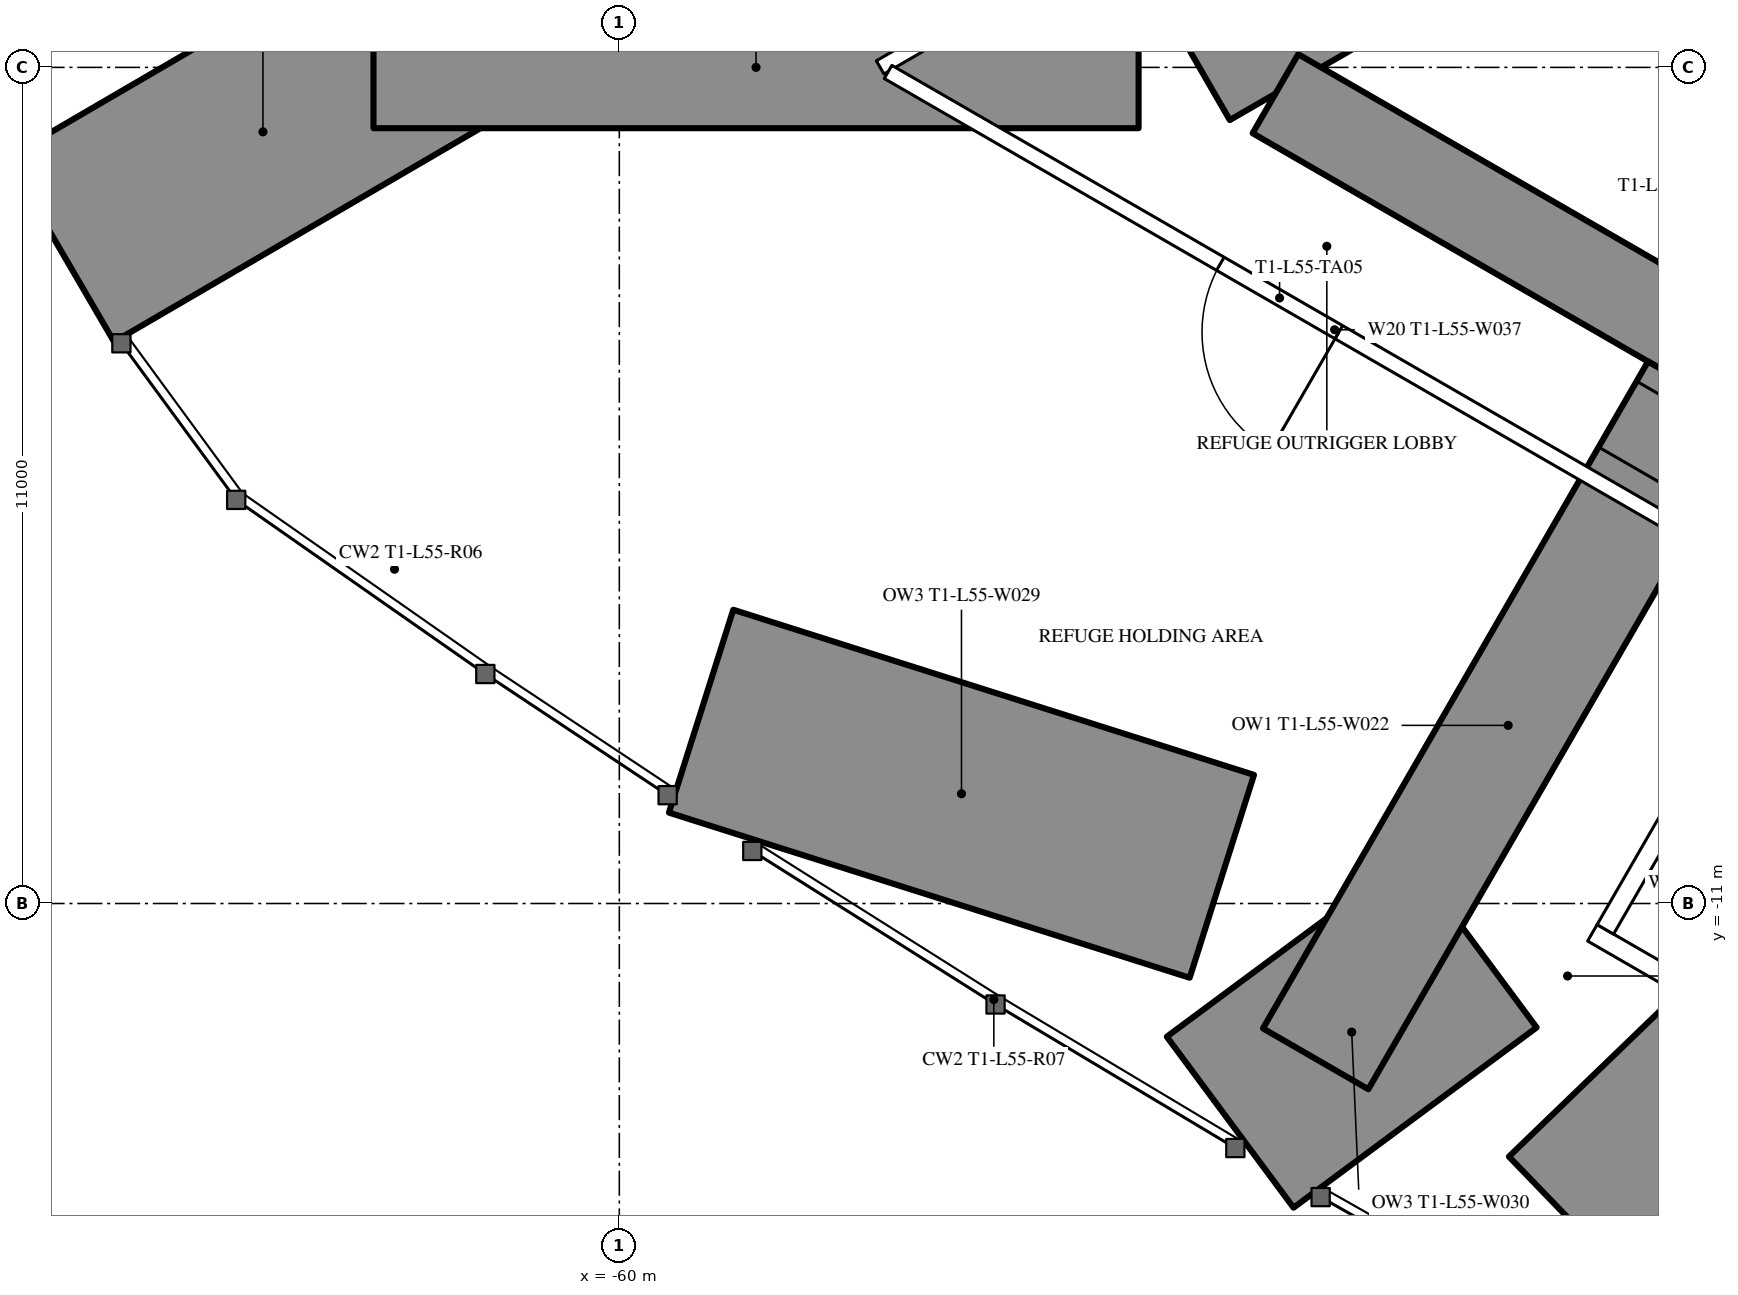
"""IFC4 building model, lengths in metres.
Left out: names, types, materials, properties, quantities, classifications, styles, units other than length and angle.
Written with IfcOpenShell. Run it as: python <this file> out.ifc"""

import sys

from ifc_helpers import new_model, si_unit, direction, frame, frame_2d, origin, place, context, subcontext, project, spatial, rectangle, extrude, element, fill, save


model = new_model("IFC4")
c1 = context("Model", 3, precision=1e-05, world=origin(), true_north=direction((0.0, 1.0)))
c2 = subcontext(c1, "Body", "Model", "MODEL_VIEW")
j1 = project(units=[si_unit("LENGTHUNIT", "METRE"), si_unit("PLANEANGLEUNIT", "RADIAN")], contexts=[c1])
p1 = place(None, origin())
s1 = spatial("IfcSite", under=j1, at=p1, CompositionType="ELEMENT")
p2 = place(p1, origin())
s2 = spatial("IfcBuilding", under=s1, at=p2, CompositionType="ELEMENT")
p3 = place(p2, frame((0.0, 0.0, 205.3)))
s3 = spatial("IfcBuildingStorey", under=s2, at=p3, CompositionType="ELEMENT", Elevation=205.3)
p4 = place(p3, frame((-67.352, -2.4, 0.0), z_axis=(0.0, 0.0, 1.0), x_axis=(0.863922467906, 0.503624830054, 0.0)))
e1 = element("IfcWall", 1, at=p4, inside=s3, PredefinedType="SHEAR", context=c2, shape_type="SweptSolid", body=[
    extrude(rectangle(XDim=6.166, YDim=2.8, at=frame_2d((3.083, 0.0))), origin(), (0.0, 0.0, 1.0), 5.0),
])
p5 = place(p3, frame((-58.924, -8.47, 0.0), z_axis=(0.0, 0.0, 1.0), x_axis=(0.953237559777, -0.302222028698, 0.0)))
e2 = element("IfcWall", 2, at=p5, inside=s3, PredefinedType="SHEAR", context=c2, shape_type="SweptSolid", body=[
    extrude(rectangle(XDim=7.187, YDim=2.8, at=frame_2d((3.594, 0.0))), origin(), (0.0, 0.0, 1.0), 5.0),
])
p6 = place(p3, frame((-51.964, -13.877, 0.0), z_axis=(0.0, 0.0, 1.0), x_axis=(0.80337247009, 0.595476846151, 0.0)))
e3 = element("IfcWall", 3, at=p6, inside=s3, PredefinedType="SHEAR", context=c2, shape_type="SweptSolid", body=[
    extrude(rectangle(XDim=3.981, YDim=2.8, at=frame_2d((1.99, 0.0))), origin(), (0.0, 0.0, 1.0), 5.0),
])
p7 = place(p3, frame((-42.929, -17.879, 0.0), z_axis=(0.0, 0.0, 1.0), x_axis=(-0.694103918888, 0.719874815356, 0.0)))
e4 = element("IfcWall", 4, at=p7, inside=s3, PredefinedType="SHEAR", context=c2, shape_type="SweptSolid", body=[
    extrude(rectangle(XDim=6.281, YDim=2.8, at=frame_2d((3.141, 0.0))), origin(), (0.0, 0.0, 1.0), 5.0),
])
p8 = place(p3, frame((-27.2, 14.3, 0.0), z_axis=(0.0, 0.0, 1.0), x_axis=(-0.866026593062, -0.499997940104, 0.0)))
e5 = element("IfcWall", 5, at=p8, inside=s3, PredefinedType="SHEAR", context=c2, shape_type="SweptSolid", body=[
    extrude(rectangle(XDim=28.946, YDim=1.2, at=frame_2d((14.473, 0.0))), origin(), (0.0, 0.0, 1.0), 5.0),
])
p9 = place(p8, frame((6.5, 0.0, 0.0)))
e6 = element("IfcOpeningElement", 6, at=p9, cuts=e5, PredefinedType="OPENING", context=c2, shape_type="SweptSolid", body=[
    extrude(rectangle(XDim=1.0, YDim=2.2, at=frame_2d((0.5, 1.1))), frame((0.0, 0.61, 0.0), z_axis=(0.0, -1.0, 0.0), x_axis=(1.0, 0.0, 0.0)), (0.0, 0.0, 1.0), 1.22),
])
p10 = place(p8, frame((13.568, 0.0, 0.0)))
e7 = element("IfcOpeningElement", 7, at=p10, cuts=e5, PredefinedType="OPENING", context=c2, shape_type="SweptSolid", body=[
    extrude(rectangle(XDim=1.8, YDim=2.2, at=frame_2d((0.9, 1.1))), frame((0.0, 0.61, 0.0), z_axis=(0.0, -1.0, 0.0), x_axis=(1.0, 0.0, 0.0)), (0.0, 0.0, 1.0), 1.22),
])
p11 = place(p3, frame((-27.2, -14.3, 0.0), z_axis=(0.0, 0.0, 1.0), x_axis=(-0.866024021859, 0.500002393557, 0.0)))
e8 = element("IfcWall", 8, at=p11, inside=s3, PredefinedType="SHEAR", context=c2, shape_type="SweptSolid", body=[
    extrude(rectangle(XDim=27.907, YDim=1.2, at=frame_2d((13.954, 0.0))), origin(), (0.0, 0.0, 1.0), 5.0),
])
p12 = place(p11, frame((6.5, 0.0, 0.0)))
e9 = element("IfcOpeningElement", 9, at=p12, cuts=e8, PredefinedType="OPENING", context=c2, shape_type="SweptSolid", body=[
    extrude(rectangle(XDim=1.0, YDim=2.2, at=frame_2d((0.5, 1.1))), frame((0.0, 0.61, 0.0), z_axis=(0.0, -1.0, 0.0), x_axis=(1.0, 0.0, 0.0)), (0.0, 0.0, 1.0), 1.22),
])
p13 = place(p11, frame((13.568, 0.0, 0.0)))
e10 = element("IfcOpeningElement", 10, at=p13, cuts=e8, PredefinedType="OPENING", context=c2, shape_type="SweptSolid", body=[
    extrude(rectangle(XDim=1.8, YDim=2.2, at=frame_2d((0.9, 1.1))), frame((0.0, 0.61, 0.0), z_axis=(0.0, -1.0, 0.0), x_axis=(1.0, 0.0, 0.0)), (0.0, 0.0, 1.0), 1.22),
])
p14 = place(p3, frame((-53.168, 0.0, 0.0), z_axis=(0.0, 0.0, 1.0), x_axis=(-1.0, 0.0, 0.0)))
e11 = element("IfcWall", 11, at=p14, inside=s3, PredefinedType="SHEAR", context=c2, shape_type="SweptSolid", body=[
    extrude(rectangle(XDim=10.066, YDim=1.6, at=frame_2d((5.033, 0.0))), origin(), (0.0, 0.0, 1.0), 5.0),
])
p15 = place(p3, frame((-45.773, -4.27, 0.0), z_axis=(0.0, 0.0, 1.0), x_axis=(-0.499995723283, -0.866027872934, 0.0)))
e12 = element("IfcWall", 12, at=p15, inside=s3, PredefinedType="SHEAR", context=c2, shape_type="SweptSolid", body=[
    extrude(rectangle(XDim=10.131, YDim=1.6, at=frame_2d((5.065, 0.0))), origin(), (0.0, 0.0, 1.0), 5.0),
])
p16 = place(p15, frame((0.3, 0.0, 0.0)))
e13 = element("IfcOpeningElement", 13, at=p16, cuts=e12, PredefinedType="OPENING", context=c2, shape_type="SweptSolid", body=[
    extrude(rectangle(XDim=1.0, YDim=2.2, at=frame_2d((0.5, 1.1))), frame((0.0, 0.81, 0.0), z_axis=(0.0, -1.0, 0.0), x_axis=(1.0, 0.0, 0.0)), (0.0, 0.0, 1.0), 1.62),
])
p17 = place(p3, frame((-27.86, 16.575, 0.0), z_axis=(0.0, 0.0, 1.0), x_axis=(-0.866025533911, -0.499999774615, 0.0)))
e14 = element("IfcWall", 14, at=p17, inside=s3, PredefinedType="PARTITIONING", context=c2, shape_type="SweptSolid", body=[
    extrude(rectangle(XDim=33.149, YDim=0.2, at=frame_2d((16.575, 0.0))), origin(), (0.0, 0.0, 1.0), 4.75),
])
p18 = place(p17, frame((6.051, 0.0, 0.0)))
e15 = element("IfcOpeningElement", 15, at=p18, cuts=e14, PredefinedType="OPENING", context=c2, shape_type="SweptSolid", body=[
    extrude(rectangle(XDim=1.8, YDim=2.2, at=frame_2d((0.9, 1.1))), frame((0.0, 0.11, 0.0), z_axis=(0.0, -1.0, 0.0), x_axis=(1.0, 0.0, 0.0)), (0.0, 0.0, 1.0), 0.22),
])
p19 = place(p17, frame((16.234, 0.0, 0.0)))
e16 = element("IfcOpeningElement", 16, at=p19, cuts=e14, PredefinedType="OPENING", context=c2, shape_type="SweptSolid", body=[
    extrude(rectangle(XDim=2.0, YDim=2.4, at=frame_2d((1.0, 1.2))), frame((0.0, 0.11, 0.0), z_axis=(0.0, -1.0, 0.0), x_axis=(1.0, 0.0, 0.0)), (0.0, 0.0, 1.0), 0.22),
])
p20 = place(p17, frame((26.082, 0.0, 0.0)))
e17 = element("IfcOpeningElement", 17, at=p20, cuts=e14, PredefinedType="OPENING", context=c2, shape_type="SweptSolid", body=[
    extrude(rectangle(XDim=2.0, YDim=2.4, at=frame_2d((1.0, 1.2))), frame((0.0, 0.11, 0.0), z_axis=(0.0, -1.0, 0.0), x_axis=(1.0, 0.0, 0.0)), (0.0, 0.0, 1.0), 0.22),
])
p21 = place(p3, frame((-44.715, -6.844, 0.0), z_axis=(0.0, 0.0, 1.0), x_axis=(-0.866025261224, 0.500000246922, 0.0)))
e18 = element("IfcWall", 18, at=p21, inside=s3, PredefinedType="PARTITIONING", context=c2, shape_type="SweptSolid", body=[
    extrude(rectangle(XDim=13.567, YDim=0.2, at=frame_2d((6.783, 0.0))), origin(), (0.0, 0.0, 1.0), 4.75),
])
p22 = place(p21, frame((6.719, 0.0, 0.0)))
e19 = element("IfcOpeningElement", 19, at=p22, cuts=e18, PredefinedType="OPENING", context=c2, shape_type="SweptSolid", body=[
    extrude(rectangle(XDim=1.8, YDim=2.2, at=frame_2d((0.9, 1.1))), frame((0.0, 0.11, 0.0), z_axis=(0.0, -1.0, 0.0), x_axis=(1.0, 0.0, 0.0)), (0.0, 0.0, 1.0), 0.22),
])
p23 = place(p3, frame((-41.482, -14.686, 0.0), z_axis=(0.0, 0.0, 1.0), x_axis=(-0.86603344179, 0.499986077507, 0.0)))
e20 = element("IfcWall", 20, at=p23, inside=s3, PredefinedType="PARTITIONING", context=c2, shape_type="SweptSolid", body=[
    extrude(rectangle(XDim=6.6, YDim=0.25, at=frame_2d((3.3, 0.0))), origin(), (0.0, 0.0, 1.0), 4.75),
])
p24 = place(p3, frame((-45.428, -8.568, 0.0), z_axis=(0.0, 0.0, 1.0), x_axis=(-0.499929347863, -0.866066190972, 0.0)))
e21 = element("IfcWall", 21, at=p24, inside=s3, PredefinedType="PARTITIONING", context=c2, shape_type="SweptSolid", body=[
    extrude(rectangle(XDim=3.201, YDim=0.25, at=frame_2d((1.6, 0.0))), origin(), (0.0, 0.0, 1.0), 4.75),
])
p25 = place(p16, origin())
e22 = element("IfcDoor", 22, at=p25, inside=s3, OperationType="SINGLE_SWING_LEFT", PredefinedType="DOOR", context=c2, shape_type="SweptSolid", body=[
    extrude(rectangle(XDim=1.0, YDim=2.2, at=frame_2d((0.5, 1.1))), frame((0.0, 0.025, 0.0), z_axis=(0.0, -1.0, 0.0), x_axis=(1.0, 0.0, 0.0)), (0.0, 0.0, 1.0), 0.05),
])
fill(e13, e22)
p26 = place(p22, origin())
e23 = element("IfcDoor", 23, at=p26, inside=s3, OperationType="DOUBLE_DOOR_SINGLE_SWING", PredefinedType="DOOR", context=c2, shape_type="SweptSolid", body=[
    extrude(rectangle(XDim=1.8, YDim=2.2, at=frame_2d((0.9, 1.1))), frame((0.0, 0.025, 0.0), z_axis=(0.0, -1.0, 0.0), x_axis=(1.0, 0.0, 0.0)), (0.0, 0.0, 1.0), 0.05),
])
fill(e19, e23)
save(model, sys.argv[1])
